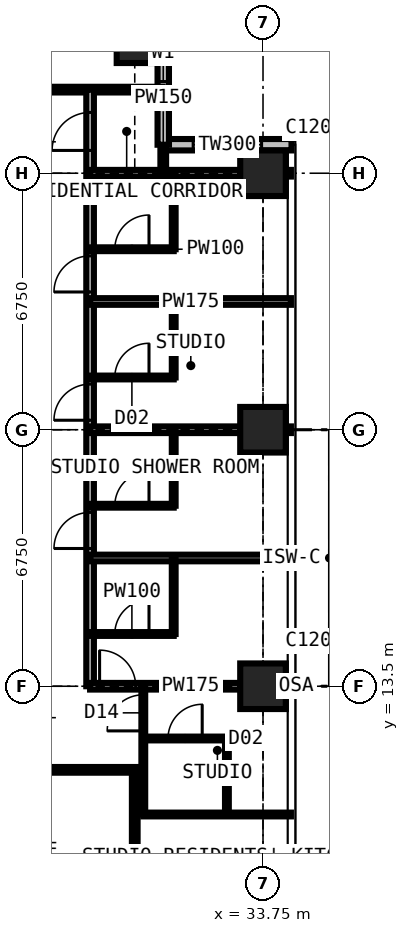
"""IFC4 building model, lengths in metres.
Left out: names, types, materials, properties, quantities, classifications, styles, units other than length and angle.
Written with IfcOpenShell. Run it as: python <this file> out.ifc"""

import sys

from ifc_helpers import new_model, si_unit, direction, frame, frame_2d, origin, origin_2d, place, context, subcontext, project, spatial, rectangle, extrude, element, fill, save


model = new_model("IFC4")
c1 = context("Model", 3, precision=1e-05, world=origin(), true_north=direction((0.0, 1.0)))
c2 = subcontext(c1, "Body", "Model", "MODEL_VIEW")
j1 = project(units=[si_unit("LENGTHUNIT", "METRE"), si_unit("PLANEANGLEUNIT", "RADIAN")], contexts=[c1])
p1 = place(None, origin())
s1 = spatial("IfcSite", under=j1, at=p1, CompositionType="ELEMENT")
p2 = place(p1, origin())
s2 = spatial("IfcBuilding", under=s1, at=p2, CompositionType="ELEMENT")
p3 = place(p2, frame((0.0, 0.0, 181.8)))
s3 = spatial("IfcBuildingStorey", under=s2, at=p3, CompositionType="ELEMENT", Elevation=181.8)
p4 = place(p3, frame((30.375, 30.375, 0.0), z_axis=(0.0, 0.0, 1.0), x_axis=(1.0, 0.0, 0.0)))
e1 = element("IfcColumn", 1, at=p4, inside=s3, PredefinedType="COLUMN", context=c2, shape_type="SweptSolid", body=[
    extrude(rectangle(XDim=0.95, YDim=0.95, at=origin_2d()), origin(), (0.0, 0.0, 1.0), 3.6),
])
for number, where, z_axis, x_axis in (
    (2, (33.75, 13.5, 0.0), (0.0, 0.0, 1.0), (1.0, 0.0, 0.0)),
    (3, (33.75, 20.25, 0.0), (0.0, 0.0, 1.0), (1.0, 0.0, 0.0)),
    (4, (33.75, 27.0, 0.0), (0.0, 0.0, 1.0), (1.0, 0.0, 0.0)),
):
    element("IfcColumn", number, at=place(p3, frame(where, z_axis=z_axis, x_axis=x_axis)), inside=s3, PredefinedType="COLUMN", context=c2, shape_type="SweptSolid", body=[
        extrude(rectangle(XDim=1.2, YDim=1.2, at=origin_2d()), origin(), (0.0, 0.0, 1.0), 3.6),
    ])
p5 = place(p3, frame((34.5, 27.75, 0.0), z_axis=(0.0, 0.0, 1.0), x_axis=(-1.0, 0.0, 0.0)))
e5 = element("IfcWall", 5, at=p5, inside=s3, PredefinedType="SOLIDWALL", context=c2, shape_type="SweptSolid", body=[
    extrude(rectangle(XDim=3.375, YDim=0.3, at=frame_2d((1.688, 0.0))), origin(), (0.0, 0.0, 1.0), 3.375),
])
p6 = place(p5, frame((0.788, 0.0, 0.6)))
e6 = element("IfcOpeningElement", 6, at=p6, cuts=e5, PredefinedType="OPENING", context=c2, shape_type="SweptSolid", body=[
    extrude(rectangle(XDim=1.8, YDim=2.1, at=frame_2d((0.9, 1.05))), frame((0.0, 0.16, 0.0), z_axis=(0.0, -1.0, 0.0), x_axis=(1.0, 0.0, 0.0)), (0.0, 0.0, 1.0), 0.32),
])
p7 = place(p3, frame((31.125, 27.75, 0.0), z_axis=(0.0, 0.0, 1.0), x_axis=(0.0, 1.0, 0.0)))
e7 = element("IfcWall", 7, at=p7, inside=s3, PredefinedType="SOLIDWALL", context=c2, shape_type="SweptSolid", body=[
    extrude(rectangle(XDim=3.375, YDim=0.3, at=frame_2d((1.688, 0.0))), origin(), (0.0, 0.0, 1.0), 3.375),
])
p8 = place(p7, frame((1.663, 0.0, 0.9)))
e8 = element("IfcOpeningElement", 8, at=p8, cuts=e7, PredefinedType="OPENING", context=c2, shape_type="SweptSolid", body=[
    extrude(rectangle(XDim=1.5, YDim=1.8, at=frame_2d((0.75, 0.9))), frame((0.0, 0.16, 0.0), z_axis=(0.0, -1.0, 0.0), x_axis=(1.0, 0.0, 0.0)), (0.0, 0.0, 1.0), 0.32),
])
p9 = place(p3, frame((10.125, 11.3, 0.0), z_axis=(0.0, 0.0, 1.0), x_axis=(1.0, 0.0, 0.0)))
e9 = element("IfcWall", 9, at=p9, inside=s3, PredefinedType="PARTITIONING", context=c2, shape_type="SweptSolid", body=[
    extrude(rectangle(XDim=20.475, YDim=0.15, at=frame_2d((10.238, 0.0))), origin(), (0.0, 0.0, 1.0), 3.375),
])
p10 = place(p9, frame((11.312, 0.0, 0.0)))
e10 = element("IfcOpeningElement", 10, at=p10, cuts=e9, PredefinedType="OPENING", context=c2, shape_type="SweptSolid", body=[
    extrude(rectangle(XDim=1.0, YDim=2.2, at=frame_2d((0.5, 1.1))), frame((0.0, 0.085, 0.0), z_axis=(0.0, -1.0, 0.0), x_axis=(1.0, 0.0, 0.0)), (0.0, 0.0, 1.0), 0.17),
])
p11 = place(p3, frame((11.3, 29.2, 0.0), z_axis=(0.0, 0.0, 1.0), x_axis=(1.0, 0.0, 0.0)))
e11 = element("IfcWall", 11, at=p11, inside=s3, PredefinedType="PARTITIONING", context=c2, shape_type="SweptSolid", body=[
    extrude(rectangle(XDim=19.809, YDim=0.15, at=frame_2d((9.904, 0.0))), origin(), (0.0, 0.0, 1.0), 3.375),
])
p12 = place(p11, frame((14.625, 0.0, 0.0)))
e12 = element("IfcOpeningElement", 12, at=p12, cuts=e11, PredefinedType="OPENING", context=c2, shape_type="SweptSolid", body=[
    extrude(rectangle(XDim=1.0, YDim=2.2, at=frame_2d((0.5, 1.1))), frame((0.0, 0.085, 0.0), z_axis=(0.0, -1.0, 0.0), x_axis=(1.0, 0.0, 0.0)), (0.0, 0.0, 1.0), 0.17),
])
p13 = place(p11, frame((5.825, 0.0, 0.0)))
e13 = element("IfcOpeningElement", 13, at=p13, cuts=e11, PredefinedType="OPENING", context=c2, shape_type="SweptSolid", body=[
    extrude(rectangle(XDim=0.95, YDim=2.2, at=frame_2d((0.475, 1.1))), frame((0.0, 0.085, 0.0), z_axis=(0.0, -1.0, 0.0), x_axis=(1.0, 0.0, 0.0)), (0.0, 0.0, 1.0), 0.17),
])
p14 = place(p11, frame((9.2, 0.0, 0.0)))
e14 = element("IfcOpeningElement", 14, at=p14, cuts=e11, PredefinedType="OPENING", context=c2, shape_type="SweptSolid", body=[
    extrude(rectangle(XDim=0.95, YDim=2.2, at=frame_2d((0.475, 1.1))), frame((0.0, 0.085, 0.0), z_axis=(0.0, -1.0, 0.0), x_axis=(1.0, 0.0, 0.0)), (0.0, 0.0, 1.0), 0.17),
])
p15 = place(p11, frame((0.6, 0.0, 0.0)))
e15 = element("IfcOpeningElement", 15, at=p15, cuts=e11, PredefinedType="OPENING", context=c2, shape_type="SweptSolid", body=[
    extrude(rectangle(XDim=1.0, YDim=2.2, at=frame_2d((0.5, 1.1))), frame((0.0, 0.085, 0.0), z_axis=(0.0, -1.0, 0.0), x_axis=(1.0, 0.0, 0.0)), (0.0, 0.0, 1.0), 0.17),
])
p16 = place(p3, frame((29.2, 13.5, 0.0), z_axis=(0.0, 0.0, 1.0), x_axis=(0.0, 1.0, 0.0)))
e16 = element("IfcWall", 16, at=p16, inside=s3, PredefinedType="PARTITIONING", context=c2, shape_type="SweptSolid", body=[
    extrude(rectangle(XDim=15.7, YDim=0.2, at=frame_2d((7.85, 0.0))), origin(), (0.0, 0.0, 1.0), 3.375),
])
p17 = place(p16, frame((3.625, 0.0, 0.0)))
e17 = element("IfcOpeningElement", 17, at=p17, cuts=e16, PredefinedType="OPENING", context=c2, shape_type="SweptSolid", body=[
    extrude(rectangle(XDim=0.95, YDim=2.2, at=frame_2d((0.475, 1.1))), frame((0.0, 0.11, 0.0), z_axis=(0.0, -1.0, 0.0), x_axis=(1.0, 0.0, 0.0)), (0.0, 0.0, 1.0), 0.22),
])
p18 = place(p16, frame((7.0, 0.0, 0.0)))
e18 = element("IfcOpeningElement", 18, at=p18, cuts=e16, PredefinedType="OPENING", context=c2, shape_type="SweptSolid", body=[
    extrude(rectangle(XDim=0.95, YDim=2.2, at=frame_2d((0.475, 1.1))), frame((0.0, 0.11, 0.0), z_axis=(0.0, -1.0, 0.0), x_axis=(1.0, 0.0, 0.0)), (0.0, 0.0, 1.0), 0.22),
])
p19 = place(p16, frame((10.375, 0.0, 0.0)))
e19 = element("IfcOpeningElement", 19, at=p19, cuts=e16, PredefinedType="OPENING", context=c2, shape_type="SweptSolid", body=[
    extrude(rectangle(XDim=0.95, YDim=2.2, at=frame_2d((0.475, 1.1))), frame((0.0, 0.11, 0.0), z_axis=(0.0, -1.0, 0.0), x_axis=(1.0, 0.0, 0.0)), (0.0, 0.0, 1.0), 0.22),
])
p20 = place(p16, frame((14.1, 0.0, 0.0)))
e20 = element("IfcOpeningElement", 20, at=p20, cuts=e16, PredefinedType="OPENING", context=c2, shape_type="SweptSolid", body=[
    extrude(rectangle(XDim=1.0, YDim=2.2, at=frame_2d((0.5, 1.1))), frame((0.0, 0.11, 0.0), z_axis=(0.0, -1.0, 0.0), x_axis=(1.0, 0.0, 0.0)), (0.0, 0.0, 1.0), 0.22),
])
p21 = place(p3, frame((29.2, 13.5, 0.0), z_axis=(0.0, 0.0, 1.0), x_axis=(1.0, 0.0, 0.0)))
e21 = element("IfcWall", 21, at=p21, inside=s3, PredefinedType="PARTITIONING", context=c2, shape_type="SweptSolid", body=[
    extrude(rectangle(XDim=5.284, YDim=0.175, at=frame_2d((2.642, 0.0))), origin(), (0.0, 0.0, 1.0), 2.61),
])
p22 = place(p21, frame((0.25, 0.0, 0.0)))
e22 = element("IfcOpeningElement", 22, at=p22, cuts=e21, PredefinedType="OPENING", context=c2, shape_type="SweptSolid", body=[
    extrude(rectangle(XDim=0.95, YDim=2.2, at=frame_2d((0.475, 1.1))), frame((0.0, 0.097, 0.0), z_axis=(0.0, -1.0, 0.0), x_axis=(1.0, 0.0, 0.0)), (0.0, 0.0, 1.0), 0.195),
])
p23 = place(p3, frame((29.2, 14.875, 0.0), z_axis=(0.0, 0.0, 1.0), x_axis=(1.0, 0.0, 0.0)))
e23 = element("IfcWall", 23, at=p23, inside=s3, PredefinedType="PARTITIONING", context=c2, shape_type="SweptSolid", body=[
    extrude(rectangle(XDim=2.2, YDim=0.1, at=frame_2d((1.1, 0.0))), origin(), (0.0, 0.0, 1.0), 3.375),
])
p24 = place(p23, frame((0.65, 0.0, 0.0)))
e24 = element("IfcOpeningElement", 24, at=p24, cuts=e23, PredefinedType="OPENING", context=c2, shape_type="SweptSolid", body=[
    extrude(rectangle(XDim=0.9, YDim=2.2, at=frame_2d((0.45, 1.1))), frame((0.0, 0.06, 0.0), z_axis=(0.0, -1.0, 0.0), x_axis=(1.0, 0.0, 0.0)), (0.0, 0.0, 1.0), 0.12),
])
p25 = place(p3, frame((29.2, 16.875, 0.0), z_axis=(0.0, 0.0, 1.0), x_axis=(1.0, 0.0, 0.0)))
e25 = element("IfcWall", 25, at=p25, inside=s3, PredefinedType="PARTITIONING", context=c2, shape_type="SweptSolid", body=[
    extrude(rectangle(XDim=5.284, YDim=0.175, at=frame_2d((2.642, 0.0))), origin(), (0.0, 0.0, 1.0), 3.375),
])
p26 = place(p3, frame((29.2, 18.25, 0.0), z_axis=(0.0, 0.0, 1.0), x_axis=(1.0, 0.0, 0.0)))
e26 = element("IfcWall", 26, at=p26, inside=s3, PredefinedType="PARTITIONING", context=c2, shape_type="SweptSolid", body=[
    extrude(rectangle(XDim=2.2, YDim=0.1, at=frame_2d((1.1, 0.0))), origin(), (0.0, 0.0, 1.0), 3.375),
])
p27 = place(p26, frame((0.65, 0.0, 0.0)))
e27 = element("IfcOpeningElement", 27, at=p27, cuts=e26, PredefinedType="OPENING", context=c2, shape_type="SweptSolid", body=[
    extrude(rectangle(XDim=0.9, YDim=2.2, at=frame_2d((0.45, 1.1))), frame((0.0, 0.06, 0.0), z_axis=(0.0, -1.0, 0.0), x_axis=(1.0, 0.0, 0.0)), (0.0, 0.0, 1.0), 0.12),
])
p28 = place(p3, frame((29.2, 20.25, 0.0), z_axis=(0.0, 0.0, 1.0), x_axis=(1.0, 0.0, 0.0)))
e28 = element("IfcWall", 28, at=p28, inside=s3, PredefinedType="PARTITIONING", context=c2, shape_type="SweptSolid", body=[
    extrude(rectangle(XDim=5.284, YDim=0.175, at=frame_2d((2.642, 0.0))), origin(), (0.0, 0.0, 1.0), 2.61),
])
p29 = place(p3, frame((29.2, 21.625, 0.0), z_axis=(0.0, 0.0, 1.0), x_axis=(1.0, 0.0, 0.0)))
e29 = element("IfcWall", 29, at=p29, inside=s3, PredefinedType="PARTITIONING", context=c2, shape_type="SweptSolid", body=[
    extrude(rectangle(XDim=2.2, YDim=0.1, at=frame_2d((1.1, 0.0))), origin(), (0.0, 0.0, 1.0), 3.375),
])
p30 = place(p29, frame((0.65, 0.0, 0.0)))
e30 = element("IfcOpeningElement", 30, at=p30, cuts=e29, PredefinedType="OPENING", context=c2, shape_type="SweptSolid", body=[
    extrude(rectangle(XDim=0.9, YDim=2.2, at=frame_2d((0.45, 1.1))), frame((0.0, 0.06, 0.0), z_axis=(0.0, -1.0, 0.0), x_axis=(1.0, 0.0, 0.0)), (0.0, 0.0, 1.0), 0.12),
])
p31 = place(p3, frame((29.2, 23.625, 0.0), z_axis=(0.0, 0.0, 1.0), x_axis=(1.0, 0.0, 0.0)))
e31 = element("IfcWall", 31, at=p31, inside=s3, PredefinedType="PARTITIONING", context=c2, shape_type="SweptSolid", body=[
    extrude(rectangle(XDim=5.284, YDim=0.175, at=frame_2d((2.642, 0.0))), origin(), (0.0, 0.0, 1.0), 3.375),
])
p32 = place(p3, frame((29.2, 25.0, 0.0), z_axis=(0.0, 0.0, 1.0), x_axis=(1.0, 0.0, 0.0)))
e32 = element("IfcWall", 32, at=p32, inside=s3, PredefinedType="PARTITIONING", context=c2, shape_type="SweptSolid", body=[
    extrude(rectangle(XDim=2.2, YDim=0.1, at=frame_2d((1.1, 0.0))), origin(), (0.0, 0.0, 1.0), 3.375),
])
p33 = place(p32, frame((0.65, 0.0, 0.0)))
e33 = element("IfcOpeningElement", 33, at=p33, cuts=e32, PredefinedType="OPENING", context=c2, shape_type="SweptSolid", body=[
    extrude(rectangle(XDim=0.9, YDim=2.2, at=frame_2d((0.45, 1.1))), frame((0.0, 0.06, 0.0), z_axis=(0.0, -1.0, 0.0), x_axis=(1.0, 0.0, 0.0)), (0.0, 0.0, 1.0), 0.12),
])
p34 = place(p3, frame((29.2, 27.0, 0.0), z_axis=(0.0, 0.0, 1.0), x_axis=(1.0, 0.0, 0.0)))
e34 = element("IfcWall", 34, at=p34, inside=s3, PredefinedType="PARTITIONING", context=c2, shape_type="SweptSolid", body=[
    extrude(rectangle(XDim=5.284, YDim=0.175, at=frame_2d((2.642, 0.0))), origin(), (0.0, 0.0, 1.0), 2.806),
])
p35 = place(p3, frame((30.375, 2.775, 0.0), z_axis=(0.0, 0.0, 1.0), x_axis=(0.0, 1.0, 0.0)))
e35 = element("IfcWall", 35, at=p35, inside=s3, PredefinedType="PARTITIONING", context=c2, shape_type="SweptSolid", body=[
    extrude(rectangle(XDim=8.525, YDim=0.15, at=frame_2d((4.263, 0.0))), origin(), (0.0, 0.0, 1.0), 2.877),
])
p36 = place(p35, frame((1.116, 0.0, 0.0)))
e36 = element("IfcOpeningElement", 36, at=p36, cuts=e35, PredefinedType="OPENING", context=c2, shape_type="SweptSolid", body=[
    extrude(rectangle(XDim=1.0, YDim=2.2, at=frame_2d((0.5, 1.1))), frame((0.0, 0.085, 0.0), z_axis=(0.0, -1.0, 0.0), x_axis=(1.0, 0.0, 0.0)), (0.0, 0.0, 1.0), 0.17),
])
p37 = place(p3, frame((30.6, 10.125, 0.0), z_axis=(0.0, 0.0, 1.0), x_axis=(0.0, 1.0, 0.0)))
e37 = element("IfcWall", 37, at=p37, inside=s3, PredefinedType="PARTITIONING", context=c2, shape_type="SweptSolid", body=[
    extrude(rectangle(XDim=3.375, YDim=0.1, at=frame_2d((1.688, 0.0))), origin(), (0.0, 0.0, 1.0), 3.375),
])
p38 = place(p37, frame((2.2, 0.0, 0.0)))
e38 = element("IfcOpeningElement", 38, at=p38, cuts=e37, PredefinedType="OPENING", context=c2, shape_type="SweptSolid", body=[
    extrude(rectangle(XDim=0.95, YDim=2.2, at=frame_2d((0.475, 1.1))), frame((0.0, 0.06, 0.0), z_axis=(0.0, -1.0, 0.0), x_axis=(1.0, 0.0, 0.0)), (0.0, 0.0, 1.0), 0.12),
])
p39 = place(p3, frame((30.6, 10.125, 0.0), z_axis=(0.0, 0.0, 1.0), x_axis=(1.0, 0.0, 0.0)))
e39 = element("IfcWall", 39, at=p39, inside=s3, PredefinedType="PARTITIONING", context=c2, shape_type="SweptSolid", body=[
    extrude(rectangle(XDim=3.884, YDim=0.1, at=frame_2d((1.942, 0.0))), origin(), (0.0, 0.0, 1.0), 3.375),
])
p40 = place(p3, frame((30.6, 12.125, 0.0), z_axis=(0.0, 0.0, 1.0), x_axis=(1.0, 0.0, 0.0)))
e40 = element("IfcWall", 40, at=p40, inside=s3, PredefinedType="PARTITIONING", context=c2, shape_type="SweptSolid", body=[
    extrude(rectangle(XDim=2.2, YDim=0.1, at=frame_2d((1.1, 0.0))), origin(), (0.0, 0.0, 1.0), 3.375),
])
p41 = place(p40, frame((0.65, 0.0, 0.0)))
e41 = element("IfcOpeningElement", 41, at=p41, cuts=e40, PredefinedType="OPENING", context=c2, shape_type="SweptSolid", body=[
    extrude(rectangle(XDim=0.9, YDim=2.2, at=frame_2d((0.45, 1.1))), frame((0.0, 0.06, 0.0), z_axis=(0.0, -1.0, 0.0), x_axis=(1.0, 0.0, 0.0)), (0.0, 0.0, 1.0), 0.12),
])
p42 = place(p3, frame((31.125, 27.0, 0.0), z_axis=(0.0, 0.0, 1.0), x_axis=(0.0, 1.0, 0.0)))
e42 = element("IfcWall", 42, at=p42, inside=s3, PredefinedType="PARTITIONING", context=c2, shape_type="SweptSolid", body=[
    extrude(rectangle(XDim=0.734, YDim=0.15, at=frame_2d((0.367, 0.0))), origin(), (0.0, 0.0, 1.0), 3.375),
])
for number, where, z_axis, x_axis in (
    (43, (31.4, 14.875, 0.0), (0.0, 0.0, 1.0), (0.0, 1.0, 0.0)),
    (44, (31.4, 18.25, 0.0), (0.0, 0.0, 1.0), (0.0, 1.0, 0.0)),
    (45, (31.4, 21.625, 0.0), (0.0, 0.0, 1.0), (0.0, 1.0, 0.0)),
    (46, (31.4, 25.0, 0.0), (0.0, 0.0, 1.0), (0.0, 1.0, 0.0)),
    (47, (32.8, 10.125, 0.0), (0.0, 0.0, 1.0), (0.0, 1.0, 0.0)),
):
    element("IfcWall", number, at=place(p3, frame(where, z_axis=z_axis, x_axis=x_axis)), inside=s3, PredefinedType="PARTITIONING", context=c2, shape_type="SweptSolid", body=[
        extrude(rectangle(XDim=2.0, YDim=0.1, at=frame_2d((1.0, 0.0))), origin(), (0.0, 0.0, 1.0), 3.375),
    ])
p43 = place(p6, origin())
e48 = element("IfcWindow", 48, at=p43, inside=s3, PartitioningType="SINGLE_PANEL", PredefinedType="WINDOW", context=c2, shape_type="SweptSolid", body=[
    extrude(rectangle(XDim=1.8, YDim=2.1, at=frame_2d((0.9, 1.05))), frame((0.0, 0.03, 0.0), z_axis=(0.0, -1.0, 0.0), x_axis=(1.0, 0.0, 0.0)), (0.0, 0.0, 1.0), 0.06),
])
fill(e6, e48)
p44 = place(p8, origin())
e49 = element("IfcWindow", 49, at=p44, inside=s3, PartitioningType="SINGLE_PANEL", PredefinedType="WINDOW", context=c2, shape_type="SweptSolid", body=[
    extrude(rectangle(XDim=1.5, YDim=1.8, at=frame_2d((0.75, 0.9))), frame((0.0, 0.03, 0.0), z_axis=(0.0, -1.0, 0.0), x_axis=(1.0, 0.0, 0.0)), (0.0, 0.0, 1.0), 0.06),
])
fill(e8, e49)
p45 = place(p38, origin())
e50 = element("IfcDoor", 50, at=p45, inside=s3, OperationType="SINGLE_SWING_LEFT", PredefinedType="DOOR", context=c2, shape_type="SweptSolid", body=[
    extrude(rectangle(XDim=0.95, YDim=2.2, at=frame_2d((0.475, 1.1))), frame((0.0, 0.025, 0.0), z_axis=(0.0, -1.0, 0.0), x_axis=(1.0, 0.0, 0.0)), (0.0, 0.0, 1.0), 0.05),
])
fill(e38, e50)
p46 = place(p41, origin())
e51 = element("IfcDoor", 51, at=p46, inside=s3, OperationType="SINGLE_SWING_RIGHT", PredefinedType="DOOR", context=c2, shape_type="SweptSolid", body=[
    extrude(rectangle(XDim=0.9, YDim=2.2, at=frame_2d((0.45, 1.1))), frame((0.0, 0.025, 0.0), z_axis=(0.0, -1.0, 0.0), x_axis=(1.0, 0.0, 0.0)), (0.0, 0.0, 1.0), 0.05),
])
fill(e41, e51)
p47 = place(p22, origin())
e52 = element("IfcDoor", 52, at=p47, inside=s3, OperationType="SINGLE_SWING_LEFT", PredefinedType="DOOR", context=c2, shape_type="SweptSolid", body=[
    extrude(rectangle(XDim=0.95, YDim=2.2, at=frame_2d((0.475, 1.1))), frame((0.0, 0.025, 0.0), z_axis=(0.0, -1.0, 0.0), x_axis=(1.0, 0.0, 0.0)), (0.0, 0.0, 1.0), 0.05),
])
fill(e22, e52)
p48 = place(p24, origin())
e53 = element("IfcDoor", 53, at=p48, inside=s3, OperationType="SINGLE_SWING_RIGHT", PredefinedType="DOOR", context=c2, shape_type="SweptSolid", body=[
    extrude(rectangle(XDim=0.9, YDim=2.2, at=frame_2d((0.45, 1.1))), frame((0.0, 0.025, 0.0), z_axis=(0.0, -1.0, 0.0), x_axis=(1.0, 0.0, 0.0)), (0.0, 0.0, 1.0), 0.05),
])
fill(e24, e53)
p49 = place(p17, origin())
e54 = element("IfcDoor", 54, at=p49, inside=s3, OperationType="SINGLE_SWING_LEFT", PredefinedType="DOOR", context=c2, shape_type="SweptSolid", body=[
    extrude(rectangle(XDim=0.95, YDim=2.2, at=frame_2d((0.475, 1.1))), frame((0.0, 0.025, 0.0), z_axis=(0.0, -1.0, 0.0), x_axis=(1.0, 0.0, 0.0)), (0.0, 0.0, 1.0), 0.05),
])
fill(e17, e54)
p50 = place(p27, origin())
e55 = element("IfcDoor", 55, at=p50, inside=s3, OperationType="SINGLE_SWING_RIGHT", PredefinedType="DOOR", context=c2, shape_type="SweptSolid", body=[
    extrude(rectangle(XDim=0.9, YDim=2.2, at=frame_2d((0.45, 1.1))), frame((0.0, 0.025, 0.0), z_axis=(0.0, -1.0, 0.0), x_axis=(1.0, 0.0, 0.0)), (0.0, 0.0, 1.0), 0.05),
])
fill(e27, e55)
p51 = place(p18, origin())
e56 = element("IfcDoor", 56, at=p51, inside=s3, OperationType="SINGLE_SWING_LEFT", PredefinedType="DOOR", context=c2, shape_type="SweptSolid", body=[
    extrude(rectangle(XDim=0.95, YDim=2.2, at=frame_2d((0.475, 1.1))), frame((0.0, 0.025, 0.0), z_axis=(0.0, -1.0, 0.0), x_axis=(1.0, 0.0, 0.0)), (0.0, 0.0, 1.0), 0.05),
])
fill(e18, e56)
p52 = place(p30, origin())
e57 = element("IfcDoor", 57, at=p52, inside=s3, OperationType="SINGLE_SWING_RIGHT", PredefinedType="DOOR", context=c2, shape_type="SweptSolid", body=[
    extrude(rectangle(XDim=0.9, YDim=2.2, at=frame_2d((0.45, 1.1))), frame((0.0, 0.025, 0.0), z_axis=(0.0, -1.0, 0.0), x_axis=(1.0, 0.0, 0.0)), (0.0, 0.0, 1.0), 0.05),
])
fill(e30, e57)
p53 = place(p19, origin())
e58 = element("IfcDoor", 58, at=p53, inside=s3, OperationType="SINGLE_SWING_LEFT", PredefinedType="DOOR", context=c2, shape_type="SweptSolid", body=[
    extrude(rectangle(XDim=0.95, YDim=2.2, at=frame_2d((0.475, 1.1))), frame((0.0, 0.025, 0.0), z_axis=(0.0, -1.0, 0.0), x_axis=(1.0, 0.0, 0.0)), (0.0, 0.0, 1.0), 0.05),
])
fill(e19, e58)
p54 = place(p33, origin())
e59 = element("IfcDoor", 59, at=p54, inside=s3, OperationType="SINGLE_SWING_RIGHT", PredefinedType="DOOR", context=c2, shape_type="SweptSolid", body=[
    extrude(rectangle(XDim=0.9, YDim=2.2, at=frame_2d((0.45, 1.1))), frame((0.0, 0.025, 0.0), z_axis=(0.0, -1.0, 0.0), x_axis=(1.0, 0.0, 0.0)), (0.0, 0.0, 1.0), 0.05),
])
fill(e33, e59)
p55 = place(p20, origin())
e60 = element("IfcDoor", 60, at=p55, inside=s3, OperationType="SINGLE_SWING_LEFT", PredefinedType="DOOR", context=c2, shape_type="SweptSolid", body=[
    extrude(rectangle(XDim=1.0, YDim=2.2, at=frame_2d((0.5, 1.1))), frame((0.0, 0.025, 0.0), z_axis=(0.0, -1.0, 0.0), x_axis=(1.0, 0.0, 0.0)), (0.0, 0.0, 1.0), 0.05),
])
fill(e20, e60)
save(model, sys.argv[1])
